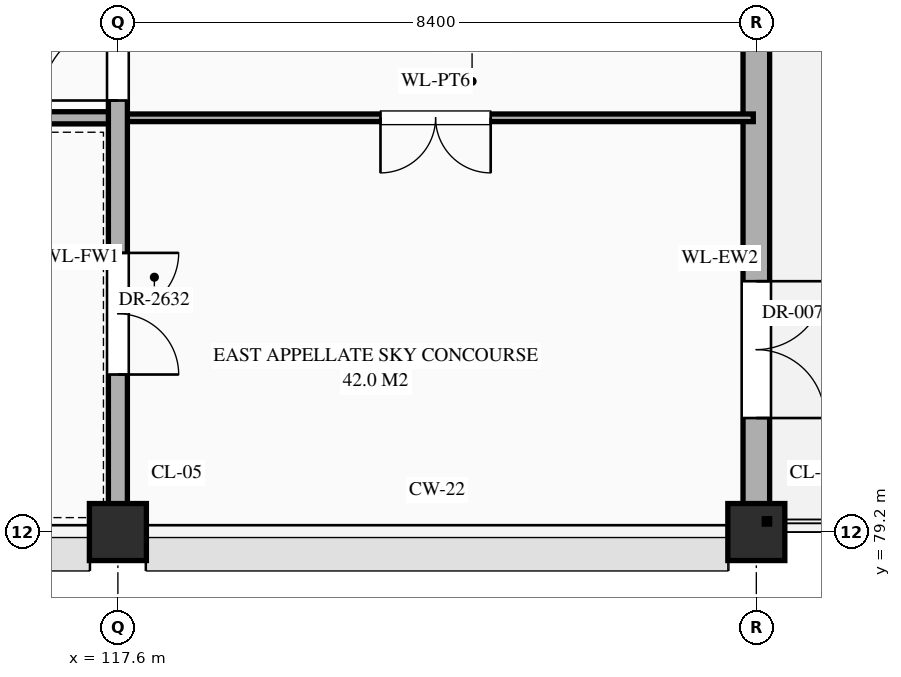
"""IFC4 building model, lengths in metres.
Left out: names, types, materials, properties, quantities, classifications, styles, units other than length and angle.
Written with IfcOpenShell. Run it as: python <this file> out.ifc"""

import sys

from ifc_helpers import new_model, si_unit, direction, frame, frame_2d, origin, origin_2d, place, context, subcontext, project, spatial, rectangle, extrude, element, fill, save


model = new_model("IFC4")
c1 = context("Model", 3, precision=1e-05, world=origin(), true_north=direction((0.0, 1.0)))
c2 = subcontext(c1, "Body", "Model", "MODEL_VIEW")
j1 = project(units=[si_unit("LENGTHUNIT", "METRE"), si_unit("PLANEANGLEUNIT", "RADIAN")], contexts=[c1])
p1 = place(None, origin())
s1 = spatial("IfcSite", under=j1, at=p1, CompositionType="ELEMENT")
p2 = place(p1, origin())
s2 = spatial("IfcBuilding", under=s1, at=p2, CompositionType="ELEMENT")
p3 = place(p2, frame((0.0, 0.0, 35.1)))
s3 = spatial("IfcBuildingStorey", under=s2, at=p3, CompositionType="ELEMENT", Elevation=35.1)
for number, where, z_axis, x_axis in (
    (1, (117.6, 79.2, 0.0), (0.0, 0.0, 1.0), (1.0, 0.0, 0.0)),
    (2, (126.0, 79.2, 0.0), (0.0, 0.0, 1.0), (1.0, 0.0, 0.0)),
):
    element("IfcColumn", number, at=place(p3, frame(where, z_axis=z_axis, x_axis=x_axis)), inside=s3, PredefinedType="COLUMN", context=c2, shape_type="SweptSolid", body=[
        extrude(rectangle(XDim=0.75, YDim=0.75, at=origin_2d()), origin(), (0.0, 0.0, 1.0), 4.2),
    ])
p4 = place(p3, frame((126.0, 79.57, 0.0), z_axis=(0.0, 0.0, 1.0), x_axis=(0.0, 1.0, 0.0)))
e3 = element("IfcWall", 3, at=p4, inside=s3, PredefinedType="STANDARD", context=c2, shape_type="SweptSolid", body=[
    extrude(rectangle(XDim=6.46, YDim=0.35, at=frame_2d((3.23, 0.0))), origin(), (0.0, 0.0, 1.0), 3.3),
])
p5 = place(p4, frame((1.13, 0.0, 0.0)))
e4 = element("IfcOpeningElement", 4, at=p5, cuts=e3, PredefinedType="OPENING", context=c2, shape_type="SweptSolid", body=[
    extrude(rectangle(XDim=1.8, YDim=2.25, at=frame_2d((0.9, 1.125))), frame((0.0, 0.187, 0.0), z_axis=(0.0, -1.0, 0.0), x_axis=(1.0, 0.0, 0.0)), (0.0, 0.0, 1.0), 0.374),
])
p6 = place(p3, frame((100.8, 84.65, 0.0), z_axis=(0.0, 0.0, 1.0), x_axis=(1.0, 0.0, 0.0)))
e5 = element("IfcWall", 5, at=p6, inside=s3, PredefinedType="STANDARD", context=c2, shape_type="SweptSolid", body=[
    extrude(rectangle(XDim=16.8, YDim=0.16, at=frame_2d((8.4, 0.0))), origin(), (0.0, 0.0, 1.0), 3.95),
])
p7 = place(p6, frame((7.55, 0.0, 0.0)))
e6 = element("IfcOpeningElement", 6, at=p7, cuts=e5, PredefinedType="OPENING", context=c2, shape_type="SweptSolid", body=[
    extrude(rectangle(XDim=1.7, YDim=2.45, at=frame_2d((0.85, 1.225))), frame((0.0, 0.092, 0.0), z_axis=(0.0, -1.0, 0.0), x_axis=(1.0, 0.0, 0.0)), (0.0, 0.0, 1.0), 0.184),
])
p8 = place(p3, frame((117.6, 84.65, 0.0), z_axis=(0.0, 0.0, 1.0), x_axis=(1.0, 0.0, 0.0)))
e7 = element("IfcWall", 7, at=p8, inside=s3, PredefinedType="STANDARD", context=c2, shape_type="SweptSolid", body=[
    extrude(rectangle(XDim=8.36, YDim=0.1, at=frame_2d((4.18, 0.0))), origin(), (0.0, 0.0, 1.0), 3.95),
])
p9 = place(p8, frame((3.455, 0.0, 0.0)))
e8 = element("IfcOpeningElement", 8, at=p9, cuts=e7, PredefinedType="OPENING", context=c2, shape_type="SweptSolid", body=[
    extrude(rectangle(XDim=1.45, YDim=2.3, at=frame_2d((0.725, 1.15))), frame((0.0, 0.062, 0.0), z_axis=(0.0, -1.0, 0.0), x_axis=(1.0, 0.0, 0.0)), (0.0, 0.0, 1.0), 0.124),
])
p10 = place(p3, frame((117.6, 79.24, 0.0), z_axis=(0.0, 0.0, 1.0), x_axis=(0.0, 1.0, 0.0)))
e9 = element("IfcWall", 9, at=p10, inside=s3, PredefinedType="STANDARD", context=c2, shape_type="SweptSolid", body=[
    extrude(rectangle(XDim=7.16, YDim=0.25, at=frame_2d((3.58, 0.0))), origin(), (0.0, 0.0, 1.0), 3.2),
])
p11 = place(p10, frame((5.637, 0.0, 0.0)))
e10 = element("IfcOpeningElement", 10, at=p11, cuts=e9, PredefinedType="OPENING", context=c2, shape_type="SweptSolid", body=[
    extrude(rectangle(XDim=1.0, YDim=2.2, at=frame_2d((0.5, 1.1))), frame((0.0, 0.137, 0.0), z_axis=(0.0, -1.0, 0.0), x_axis=(1.0, 0.0, 0.0)), (0.0, 0.0, 1.0), 0.274),
])
p12 = place(p10, frame((2.032, 0.0, 0.0)))
e11 = element("IfcOpeningElement", 11, at=p12, cuts=e9, PredefinedType="OPENING", context=c2, shape_type="SweptSolid", body=[
    extrude(rectangle(XDim=1.6, YDim=2.3, at=frame_2d((0.8, 1.15))), frame((0.0, 0.137, 0.0), z_axis=(0.0, -1.0, 0.0), x_axis=(1.0, 0.0, 0.0)), (0.0, 0.0, 1.0), 0.274),
])
p13 = place(p5, frame((1.8, 0.0, 0.0), z_axis=(0.0, 0.0, 1.0), x_axis=(-1.0, 0.0, 0.0)))
e12 = element("IfcDoor", 12, at=p13, inside=s3, OperationType="DOUBLE_DOOR_SINGLE_SWING", PredefinedType="DOOR", context=c2, shape_type="SweptSolid", body=[
    extrude(rectangle(XDim=1.8, YDim=2.25, at=frame_2d((0.9, 1.125))), frame((0.0, 0.025, 0.0), z_axis=(0.0, -1.0, 0.0), x_axis=(1.0, 0.0, 0.0)), (0.0, 0.0, 1.0), 0.05),
])
fill(e4, e12)
p14 = place(p11, origin())
e13 = element("IfcDoor", 13, at=p14, inside=s3, OperationType="SINGLE_SWING_LEFT", PredefinedType="DOOR", context=c2, shape_type="SweptSolid", body=[
    extrude(rectangle(XDim=1.0, YDim=2.2, at=frame_2d((0.5, 1.1))), frame((0.0, 0.025, 0.0), z_axis=(0.0, -1.0, 0.0), x_axis=(1.0, 0.0, 0.0)), (0.0, 0.0, 1.0), 0.05),
])
fill(e10, e13)
p15 = place(p9, frame((1.45, 0.0, 0.0), z_axis=(0.0, 0.0, 1.0), x_axis=(-1.0, 0.0, 0.0)))
e14 = element("IfcDoor", 14, at=p15, inside=s3, OperationType="DOUBLE_DOOR_SINGLE_SWING", PredefinedType="DOOR", context=c2, shape_type="SweptSolid", body=[
    extrude(rectangle(XDim=1.45, YDim=2.3, at=frame_2d((0.725, 1.15))), frame((0.0, 0.025, 0.0), z_axis=(0.0, -1.0, 0.0), x_axis=(1.0, 0.0, 0.0)), (0.0, 0.0, 1.0), 0.05),
])
fill(e8, e14)
p16 = place(p12, frame((1.6, 0.0, 0.0), z_axis=(0.0, 0.0, 1.0), x_axis=(-1.0, 0.0, 0.0)))
e15 = element("IfcDoor", 15, at=p16, inside=s3, OperationType="DOUBLE_DOOR_SINGLE_SWING", PredefinedType="DOOR", context=c2, shape_type="SweptSolid", body=[
    extrude(rectangle(XDim=1.6, YDim=2.3, at=frame_2d((0.8, 1.15))), frame((0.0, 0.025, 0.0), z_axis=(0.0, -1.0, 0.0), x_axis=(1.0, 0.0, 0.0)), (0.0, 0.0, 1.0), 0.05),
])
fill(e11, e15)
save(model, sys.argv[1])
